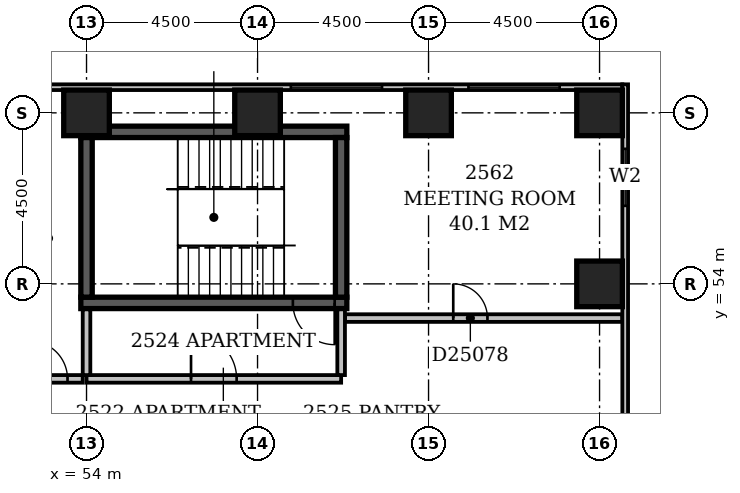
"""IFC4 building model, lengths in metres.
Left out: names, types, materials, properties, quantities, classifications, styles, units other than length and angle.
Written with IfcOpenShell. Run it as: python <this file> out.ifc"""

import sys

from ifc_helpers import new_model, si_unit, direction, frame, frame_2d, origin, origin_2d, place, context, subcontext, project, spatial, rectangle, extrude, element, fill, save


model = new_model("IFC4")
c1 = context("Model", 3, precision=1e-05, world=origin(), true_north=direction((0.0, 1.0)))
c2 = subcontext(c1, "Body", "Model", "MODEL_VIEW")
j1 = project(units=[si_unit("LENGTHUNIT", "METRE"), si_unit("PLANEANGLEUNIT", "RADIAN")], contexts=[c1])
p1 = place(None, origin())
s1 = spatial("IfcSite", under=j1, at=p1, CompositionType="ELEMENT")
p2 = place(p1, origin())
s2 = spatial("IfcBuilding", under=s1, at=p2, CompositionType="ELEMENT")
p3 = place(p2, frame((0.0, 0.0, 101.0)))
s3 = spatial("IfcBuildingStorey", under=s2, at=p3, CompositionType="ELEMENT", Elevation=101.0)
p4 = place(p3, frame((53.85, 53.5, -0.3), z_axis=(0.0, 0.0, 1.0), x_axis=(1.0, 0.0, 0.0)))
e1 = element("IfcWall", 1, at=p4, inside=s3, PredefinedType="SHEAR", context=c2, shape_type="SweptSolid", body=[
    extrude(rectangle(XDim=7.0, YDim=0.3, at=frame_2d((3.5, 0.0))), origin(), (0.0, 0.0, 1.0), 3.6),
])
p5 = place(p4, frame((5.58, 0.0, 0.3)))
e2 = element("IfcOpeningElement", 2, at=p5, cuts=e1, PredefinedType="OPENING", context=c2, shape_type="SweptSolid", body=[
    extrude(rectangle(XDim=1.1, YDim=2.1, at=frame_2d((0.55, 1.05))), frame((0.0, 0.162, 0.0), z_axis=(0.0, -1.0, 0.0), x_axis=(1.0, 0.0, 0.0)), (0.0, 0.0, 1.0), 0.324),
])
p6 = place(p3, frame((53.85, 58.0, -0.3), z_axis=(0.0, 0.0, 1.0), x_axis=(1.0, 0.0, 0.0)))
e3 = element("IfcWall", 3, at=p6, inside=s3, PredefinedType="SHEAR", context=c2, shape_type="SweptSolid", body=[
    extrude(rectangle(XDim=7.0, YDim=0.3, at=frame_2d((3.5, 0.0))), origin(), (0.0, 0.0, 1.0), 3.6),
])
for number, where, z_axis, x_axis in (
    (4, (54.0, 53.65, -0.3), (0.0, 0.0, 1.0), (0.0, 1.0, 0.0)),
    (5, (60.7, 53.65, -0.3), (0.0, 0.0, 1.0), (0.0, 1.0, 0.0)),
):
    element("IfcWall", number, at=place(p3, frame(where, z_axis=z_axis, x_axis=x_axis)), inside=s3, PredefinedType="SHEAR", context=c2, shape_type="SweptSolid", body=[
        extrude(rectangle(XDim=4.2, YDim=0.3, at=frame_2d((2.1, 0.0))), origin(), (0.0, 0.0, 1.0), 3.6),
    ])
for number, where, z_axis, x_axis in (
    (6, (67.5, 54.0, -0.3), (0.0, 0.0, 1.0), (1.0, 0.0, 0.0)),
    (7, (54.0, 58.5, -0.3), (0.0, 0.0, 1.0), (1.0, 0.0, 0.0)),
    (8, (58.5, 58.5, -0.3), (0.0, 0.0, 1.0), (1.0, 0.0, 0.0)),
    (9, (63.0, 58.5, -0.3), (0.0, 0.0, 1.0), (1.0, 0.0, 0.0)),
    (10, (67.5, 58.5, -0.3), (0.0, 0.0, 1.0), (1.0, 0.0, 0.0)),
):
    element("IfcColumn", number, at=place(p3, frame(where, z_axis=z_axis, x_axis=x_axis)), inside=s3, PredefinedType="COLUMN", context=c2, shape_type="SweptSolid", body=[
        extrude(rectangle(XDim=1.2, YDim=1.2, at=origin_2d()), origin(), (0.0, 0.0, 1.0), 3.6),
    ])
p7 = place(p3, frame((68.175, 35.4, 0.0), z_axis=(0.0, 0.0, 1.0), x_axis=(0.0, 1.0, 0.0)))
e11 = element("IfcWall", 11, at=p7, inside=s3, PredefinedType="STANDARD", context=c2, shape_type="SweptSolid", body=[
    extrude(rectangle(XDim=23.85, YDim=0.15, at=frame_2d((11.925, 0.0))), origin(), (0.0, 0.0, 1.0), 2.7),
])
p8 = place(p7, frame((1.65, 0.0, 0.6)))
e12 = element("IfcOpeningElement", 12, at=p8, cuts=e11, PredefinedType="OPENING", context=c2, shape_type="SweptSolid", body=[
    extrude(rectangle(XDim=2.4, YDim=1.8, at=frame_2d((1.2, 0.9))), frame((0.0, 0.087, 0.0), z_axis=(0.0, -1.0, 0.0), x_axis=(1.0, 0.0, 0.0)), (0.0, 0.0, 1.0), 0.174),
])
p9 = place(p7, frame((10.65, 0.0, 0.6)))
e13 = element("IfcOpeningElement", 13, at=p9, cuts=e11, PredefinedType="OPENING", context=c2, shape_type="SweptSolid", body=[
    extrude(rectangle(XDim=2.4, YDim=1.8, at=frame_2d((1.2, 0.9))), frame((0.0, 0.087, 0.0), z_axis=(0.0, -1.0, 0.0), x_axis=(1.0, 0.0, 0.0)), (0.0, 0.0, 1.0), 0.174),
])
p10 = place(p7, frame((20.653, 0.0, 0.6)))
e14 = element("IfcOpeningElement", 14, at=p10, cuts=e11, PredefinedType="OPENING", context=c2, shape_type="SweptSolid", body=[
    extrude(rectangle(XDim=1.5, YDim=1.8, at=frame_2d((0.75, 0.9))), frame((0.0, 0.087, 0.0), z_axis=(0.0, -1.0, 0.0), x_axis=(1.0, 0.0, 0.0)), (0.0, 0.0, 1.0), 0.174),
])
p11 = place(p3, frame((68.1, 59.175, 0.0), z_axis=(0.0, 0.0, 1.0), x_axis=(-1.0, 0.0, 0.0)))
e15 = element("IfcWall", 15, at=p11, inside=s3, PredefinedType="STANDARD", context=c2, shape_type="SweptSolid", body=[
    extrude(rectangle(XDim=68.85, YDim=0.15, at=frame_2d((34.425, 0.0))), origin(), (0.0, 0.0, 1.0), 2.7),
])
p12 = place(p11, frame((1.65, 0.0, 0.6)))
e16 = element("IfcOpeningElement", 16, at=p12, cuts=e15, PredefinedType="OPENING", context=c2, shape_type="SweptSolid", body=[
    extrude(rectangle(XDim=2.4, YDim=1.8, at=frame_2d((1.2, 0.9))), frame((0.0, 0.087, 0.0), z_axis=(0.0, -1.0, 0.0), x_axis=(1.0, 0.0, 0.0)), (0.0, 0.0, 1.0), 0.174),
])
p13 = place(p11, frame((6.324, 0.0, 0.6)))
e17 = element("IfcOpeningElement", 17, at=p13, cuts=e15, PredefinedType="OPENING", context=c2, shape_type="SweptSolid", body=[
    extrude(rectangle(XDim=2.4, YDim=1.8, at=frame_2d((1.2, 0.9))), frame((0.0, 0.087, 0.0), z_axis=(0.0, -1.0, 0.0), x_axis=(1.0, 0.0, 0.0)), (0.0, 0.0, 1.0), 0.174),
])
p14 = place(p3, frame((54.0, 51.5, 0.0), z_axis=(0.0, 0.0, 1.0), x_axis=(1.0, 0.0, 0.0)))
e18 = element("IfcWall", 18, at=p14, inside=s3, PredefinedType="PARTITIONING", context=c2, shape_type="SweptSolid", body=[
    extrude(rectangle(XDim=6.7, YDim=0.2, at=frame_2d((3.35, 0.0))), origin(), (0.0, 0.0, 1.0), 3.3),
])
p15 = place(p14, frame((2.75, 0.0, 0.0)))
e19 = element("IfcOpeningElement", 19, at=p15, cuts=e18, PredefinedType="OPENING", context=c2, shape_type="SweptSolid", body=[
    extrude(rectangle(XDim=1.2, YDim=2.1, at=frame_2d((0.6, 1.05))), frame((0.0, 0.112, 0.0), z_axis=(0.0, -1.0, 0.0), x_axis=(1.0, 0.0, 0.0)), (0.0, 0.0, 1.0), 0.224),
])
p16 = place(p3, frame((60.7, 51.6, 0.0), z_axis=(0.0, 0.0, 1.0), x_axis=(0.0, 1.0, 0.0)))
e20 = element("IfcWall", 20, at=p16, inside=s3, PredefinedType="PARTITIONING", context=c2, shape_type="SweptSolid", body=[
    extrude(rectangle(XDim=1.73, YDim=0.2, at=frame_2d((0.865, 0.0))), origin(), (0.0, 0.0, 1.0), 3.3),
])
p17 = place(p3, frame((54.0, 51.6, 0.0), z_axis=(0.0, 0.0, 1.0), x_axis=(0.0, 1.0, 0.0)))
e21 = element("IfcWall", 21, at=p17, inside=s3, PredefinedType="PARTITIONING", context=c2, shape_type="SweptSolid", body=[
    extrude(rectangle(XDim=1.73, YDim=0.2, at=frame_2d((0.865, 0.0))), origin(), (0.0, 0.0, 1.0), 2.6),
])
p18 = place(p3, frame((52.1, 51.5, 0.0), z_axis=(0.0, 0.0, 1.0), x_axis=(1.0, 0.0, 0.0)))
e22 = element("IfcWall", 22, at=p18, inside=s3, PredefinedType="PARTITIONING", context=c2, shape_type="SweptSolid", body=[
    extrude(rectangle(XDim=1.8, YDim=0.2, at=frame_2d((0.9, 0.0))), origin(), (0.0, 0.0, 1.0), 3.3),
])
p19 = place(p18, frame((0.4, 0.0, 0.0)))
e23 = element("IfcOpeningElement", 23, at=p19, cuts=e22, PredefinedType="OPENING", context=c2, shape_type="SweptSolid", body=[
    extrude(rectangle(XDim=1.0, YDim=2.1, at=frame_2d((0.5, 1.05))), frame((0.0, 0.112, 0.0), z_axis=(0.0, -1.0, 0.0), x_axis=(1.0, 0.0, 0.0)), (0.0, 0.0, 1.0), 0.224),
])
p20 = place(p3, frame((60.8, 53.1, 0.0), z_axis=(0.0, 0.0, 1.0), x_axis=(1.0, 0.0, 0.0)))
e24 = element("IfcWall", 24, at=p20, inside=s3, PredefinedType="PARTITIONING", context=c2, shape_type="SweptSolid", body=[
    extrude(rectangle(XDim=7.3, YDim=0.2, at=frame_2d((3.65, 0.0))), origin(), (0.0, 0.0, 1.0), 3.3),
])
p21 = place(p20, frame((2.85, 0.0, 0.0)))
e25 = element("IfcOpeningElement", 25, at=p21, cuts=e24, PredefinedType="OPENING", context=c2, shape_type="SweptSolid", body=[
    extrude(rectangle(XDim=0.9, YDim=2.1, at=frame_2d((0.45, 1.05))), frame((0.0, 0.112, 0.0), z_axis=(0.0, -1.0, 0.0), x_axis=(1.0, 0.0, 0.0)), (0.0, 0.0, 1.0), 0.224),
])
p22 = place(p10, origin())
e26 = element("IfcWindow", 26, at=p22, inside=s3, PartitioningType="SINGLE_PANEL", PredefinedType="WINDOW", context=c2, shape_type="SweptSolid", body=[
    extrude(rectangle(XDim=1.5, YDim=1.8, at=frame_2d((0.75, 0.9))), frame((0.0, 0.03, 0.0), z_axis=(0.0, -1.0, 0.0), x_axis=(1.0, 0.0, 0.0)), (0.0, 0.0, 1.0), 0.06),
])
fill(e14, e26)
p23 = place(p12, origin())
e27 = element("IfcWindow", 27, at=p23, inside=s3, PartitioningType="SINGLE_PANEL", PredefinedType="WINDOW", context=c2, shape_type="SweptSolid", body=[
    extrude(rectangle(XDim=2.4, YDim=1.8, at=frame_2d((1.2, 0.9))), frame((0.0, 0.03, 0.0), z_axis=(0.0, -1.0, 0.0), x_axis=(1.0, 0.0, 0.0)), (0.0, 0.0, 1.0), 0.06),
])
fill(e16, e27)
p24 = place(p13, origin())
e28 = element("IfcWindow", 28, at=p24, inside=s3, PartitioningType="SINGLE_PANEL", PredefinedType="WINDOW", context=c2, shape_type="SweptSolid", body=[
    extrude(rectangle(XDim=2.4, YDim=1.8, at=frame_2d((1.2, 0.9))), frame((0.0, 0.03, 0.0), z_axis=(0.0, -1.0, 0.0), x_axis=(1.0, 0.0, 0.0)), (0.0, 0.0, 1.0), 0.06),
])
fill(e17, e28)
p25 = place(p15, origin())
e29 = element("IfcDoor", 29, at=p25, inside=s3, OperationType="SINGLE_SWING_LEFT", PredefinedType="DOOR", context=c2, shape_type="SweptSolid", body=[
    extrude(rectangle(XDim=1.2, YDim=2.1, at=frame_2d((0.6, 1.05))), frame((0.0, 0.025, 0.0), z_axis=(0.0, -1.0, 0.0), x_axis=(1.0, 0.0, 0.0)), (0.0, 0.0, 1.0), 0.05),
])
fill(e19, e29)
p26 = place(p5, origin())
e30 = element("IfcDoor", 30, at=p26, inside=s3, OperationType="SINGLE_SWING_RIGHT", PredefinedType="DOOR", context=c2, shape_type="SweptSolid", body=[
    extrude(rectangle(XDim=1.1, YDim=2.1, at=frame_2d((0.55, 1.05))), frame((0.0, 0.025, 0.0), z_axis=(0.0, -1.0, 0.0), x_axis=(1.0, 0.0, 0.0)), (0.0, 0.0, 1.0), 0.05),
])
fill(e2, e30)
p27 = place(p19, origin())
e31 = element("IfcDoor", 31, at=p27, inside=s3, OperationType="SINGLE_SWING_LEFT", PredefinedType="DOOR", context=c2, shape_type="SweptSolid", body=[
    extrude(rectangle(XDim=1.0, YDim=2.1, at=frame_2d((0.5, 1.05))), frame((0.0, 0.025, 0.0), z_axis=(0.0, -1.0, 0.0), x_axis=(1.0, 0.0, 0.0)), (0.0, 0.0, 1.0), 0.05),
])
fill(e23, e31)
p28 = place(p21, origin())
e32 = element("IfcDoor", 32, at=p28, inside=s3, OperationType="SINGLE_SWING_LEFT", PredefinedType="DOOR", context=c2, shape_type="SweptSolid", body=[
    extrude(rectangle(XDim=0.9, YDim=2.1, at=frame_2d((0.45, 1.05))), frame((0.0, 0.025, 0.0), z_axis=(0.0, -1.0, 0.0), x_axis=(1.0, 0.0, 0.0)), (0.0, 0.0, 1.0), 0.05),
])
fill(e25, e32)
save(model, sys.argv[1])
